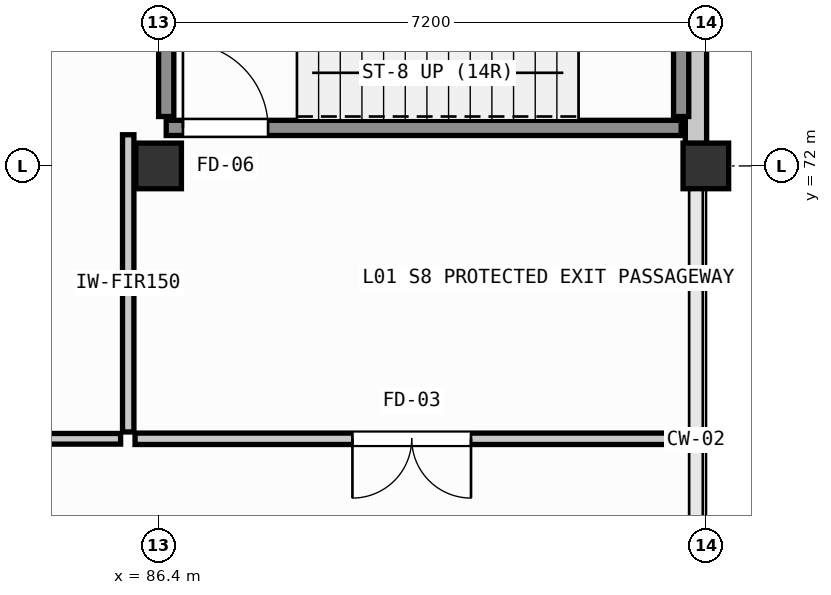
"""IFC4 building model, lengths in metres.
Left out: names, types, materials, properties, quantities, classifications, styles, units other than length and angle.
Written with IfcOpenShell. Run it as: python <this file> out.ifc"""

import sys

from ifc_helpers import new_model, si_unit, direction, frame, frame_2d, origin, origin_2d, place, context, subcontext, project, spatial, rectangle, extrude, element, fill, save


model = new_model("IFC4")
c1 = context("Model", 3, precision=1e-05, world=origin(), true_north=direction((0.0, 1.0)))
c2 = subcontext(c1, "Body", "Model", "MODEL_VIEW")
j1 = project(units=[si_unit("LENGTHUNIT", "METRE"), si_unit("PLANEANGLEUNIT", "RADIAN")], contexts=[c1])
p1 = place(None, origin())
s1 = spatial("IfcSite", under=j1, at=p1, CompositionType="ELEMENT")
p2 = place(p1, origin())
s2 = spatial("IfcBuilding", under=s1, at=p2, CompositionType="ELEMENT")
p3 = place(p2, origin())
s3 = spatial("IfcBuildingStorey", under=s2, at=p3, CompositionType="ELEMENT", Elevation=0.0)
for number, where, z_axis, x_axis in (
    (1, (86.4, 72.0, 0.0), (0.0, 0.0, 1.0), (1.0, 0.0, 0.0)),
    (2, (93.6, 72.0, 0.0), (0.0, 0.0, 1.0), (1.0, 0.0, 0.0)),
):
    element("IfcColumn", number, at=place(p3, frame(where, z_axis=z_axis, x_axis=x_axis)), inside=s3, PredefinedType="COLUMN", context=c2, shape_type="SweptSolid", body=[
        extrude(rectangle(XDim=0.6, YDim=0.6, at=origin_2d()), origin(), (0.0, 0.0, 1.0), 4.56),
    ])
p4 = place(p3, frame((93.47, 78.905, 0.0), z_axis=(0.0, 0.0, 1.0), x_axis=(0.0, -1.0, 0.0)))
e3 = element("IfcWall", 3, at=p4, inside=s3, PredefinedType="SOLIDWALL", context=c2, shape_type="SweptSolid", body=[
    extrude(rectangle(XDim=6.61, YDim=0.28, at=frame_2d((3.305, 0.0))), origin(), (0.0, 0.0, 1.0), 3.76),
])
p5 = place(p3, frame((86.5, 72.5, 0.0), z_axis=(0.0, 0.0, 1.0), x_axis=(1.0, 0.0, 0.0)))
e4 = element("IfcWall", 4, at=p5, inside=s3, PredefinedType="SHEAR", context=c2, shape_type="SweptSolid", body=[
    extrude(rectangle(XDim=6.775, YDim=0.2, at=frame_2d((3.387, 0.0))), origin(), (0.0, 0.0, 1.0), 4.8),
])
p6 = place(p5, frame((0.22, 0.0, 0.0)))
e5 = element("IfcOpeningElement", 5, at=p6, cuts=e4, PredefinedType="OPENING", context=c2, shape_type="SweptSolid", body=[
    extrude(rectangle(XDim=1.12, YDim=2.14, at=frame_2d((0.56, 1.07))), frame((0.0, 0.11, 0.0), z_axis=(0.0, -1.0, 0.0), x_axis=(1.0, 0.0, 0.0)), (0.0, 0.0, 1.0), 0.22),
])
for number, where, z_axis, x_axis in (
    (6, (86.5, 72.65, 0.0), (0.0, 0.0, 1.0), (0.0, 1.0, 0.0)),
    (7, (93.275, 72.65, 0.0), (0.0, 0.0, 1.0), (0.0, 1.0, 0.0)),
):
    element("IfcWall", number, at=place(p3, frame(where, z_axis=z_axis, x_axis=x_axis)), inside=s3, PredefinedType="SHEAR", context=c2, shape_type="SweptSolid", body=[
        extrude(rectangle(XDim=2.6, YDim=0.2, at=frame_2d((1.3, 0.0))), origin(), (0.0, 0.0, 1.0), 4.8),
    ])
p7 = place(p3, frame((86.0, 68.5, 0.0), z_axis=(0.0, 0.0, 1.0), x_axis=(0.0, 1.0, 0.0)))
e8 = element("IfcWall", 8, at=p7, inside=s3, PredefinedType="PARTITIONING", context=c2, shape_type="SweptSolid", body=[
    extrude(rectangle(XDim=3.91, YDim=0.15, at=frame_2d((1.955, 0.0))), origin(), (0.0, 0.0, 1.0), 3.76),
])
p8 = place(p3, frame((93.37, 68.41, 0.0), z_axis=(0.0, 0.0, 1.0), x_axis=(-1.0, 0.0, 0.0)))
e9 = element("IfcWall", 9, at=p8, inside=s3, PredefinedType="PARTITIONING", context=c2, shape_type="SweptSolid", body=[
    extrude(rectangle(XDim=7.28, YDim=0.15, at=frame_2d((3.64, 0.0))), origin(), (0.0, 0.0, 1.0), 3.86),
])
p9 = place(p8, frame((2.86, 0.0, 0.0)))
e10 = element("IfcOpeningElement", 10, at=p9, cuts=e9, PredefinedType="OPENING", context=c2, shape_type="SweptSolid", body=[
    extrude(rectangle(XDim=1.56, YDim=2.22, at=frame_2d((0.78, 1.11))), frame((0.0, 0.085, 0.0), z_axis=(0.0, -1.0, 0.0), x_axis=(1.0, 0.0, 0.0)), (0.0, 0.0, 1.0), 0.17),
])
p10 = place(p3, frame((85.9, 68.41, 0.0), z_axis=(0.0, 0.0, 1.0), x_axis=(-1.0, 0.0, 0.0)))
e11 = element("IfcWall", 11, at=p10, inside=s3, PredefinedType="PARTITIONING", context=c2, shape_type="SweptSolid", body=[
    extrude(rectangle(XDim=17.4, YDim=0.14, at=frame_2d((8.7, 0.0))), origin(), (0.0, 0.0, 1.0), 3.86),
])
p11 = place(p10, frame((8.04, 0.0, 0.0)))
e12 = element("IfcOpeningElement", 12, at=p11, cuts=e11, PredefinedType="OPENING", context=c2, shape_type="SweptSolid", body=[
    extrude(rectangle(XDim=1.32, YDim=2.2, at=frame_2d((0.66, 1.1))), frame((0.0, 0.08, 0.0), z_axis=(0.0, -1.0, 0.0), x_axis=(1.0, 0.0, 0.0)), (0.0, 0.0, 1.0), 0.16),
])
p12 = place(p6, origin())
e13 = element("IfcDoor", 13, at=p12, inside=s3, OperationType="SINGLE_SWING_LEFT", PredefinedType="DOOR", context=c2, shape_type="SweptSolid", body=[
    extrude(rectangle(XDim=1.12, YDim=2.14, at=frame_2d((0.56, 1.07))), frame((0.0, 0.025, 0.0), z_axis=(0.0, -1.0, 0.0), x_axis=(1.0, 0.0, 0.0)), (0.0, 0.0, 1.0), 0.05),
])
fill(e5, e13)
p13 = place(p9, origin())
e14 = element("IfcDoor", 14, at=p13, inside=s3, OperationType="DOUBLE_DOOR_SINGLE_SWING", PredefinedType="DOOR", context=c2, shape_type="SweptSolid", body=[
    extrude(rectangle(XDim=1.56, YDim=2.22, at=frame_2d((0.78, 1.11))), frame((0.0, 0.025, 0.0), z_axis=(0.0, -1.0, 0.0), x_axis=(1.0, 0.0, 0.0)), (0.0, 0.0, 1.0), 0.05),
])
fill(e10, e14)
save(model, sys.argv[1])
